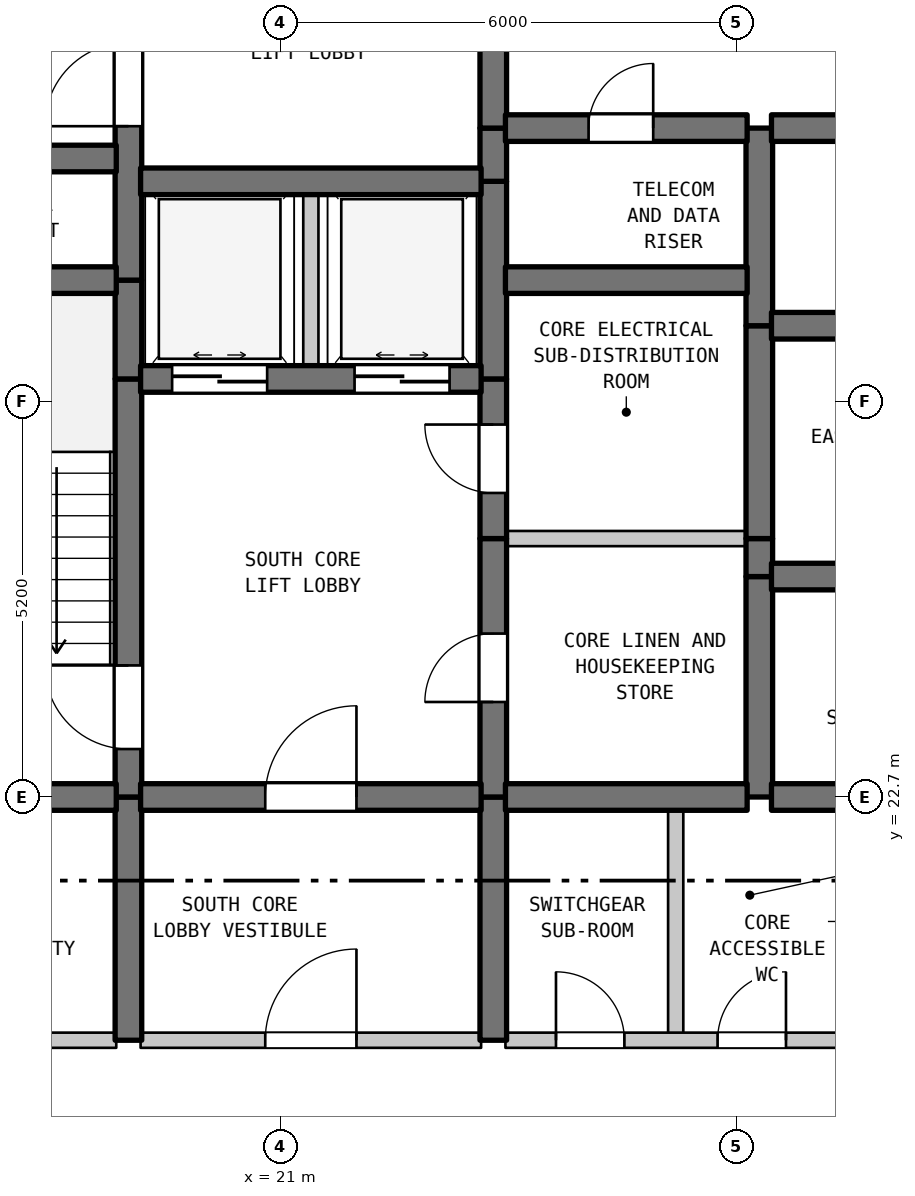
"""IFC4 building model, lengths in metres.
Left out: names, types, materials, properties, quantities, classifications, styles, units other than length and angle.
Written with IfcOpenShell. Run it as: python <this file> out.ifc"""

import sys

from ifc_helpers import new_model, si_unit, direction, frame, frame_2d, origin, place, context, subcontext, project, spatial, rectangle, extrude, element, fill, save


model = new_model("IFC4")
c1 = context("Model", 3, precision=1e-05, world=origin(), true_north=direction((0.0, 1.0)))
c2 = subcontext(c1, "Body", "Model", "MODEL_VIEW")
j1 = project(units=[si_unit("LENGTHUNIT", "METRE"), si_unit("PLANEANGLEUNIT", "RADIAN")], contexts=[c1])
p1 = place(None, origin())
s1 = spatial("IfcSite", under=j1, at=p1, CompositionType="ELEMENT")
p2 = place(p1, origin())
s2 = spatial("IfcBuilding", under=s1, at=p2, CompositionType="ELEMENT")
p3 = place(p2, frame((0.0, 0.0, 295.4)))
s3 = spatial("IfcBuildingStorey", under=s2, at=p3, CompositionType="ELEMENT", Elevation=295.4)
p4 = place(p3, frame((19.0, 19.5, 0.0), z_axis=(0.0, 0.0, 1.0), x_axis=(0.0, 1.0, 0.0)))
e1 = element("IfcWall", 1, at=p4, inside=s3, PredefinedType="SHEAR", context=c2, shape_type="SweptSolid", body=[
    extrude(rectangle(XDim=3.2, YDim=0.35, at=frame_2d((1.6, 0.0))), origin(), (0.0, 0.0, 1.0), 3.38),
])
p5 = place(p3, frame((19.0, 22.7, 0.0), z_axis=(0.0, 0.0, 1.0), x_axis=(0.0, 1.0, 0.0)))
e2 = element("IfcWall", 2, at=p5, inside=s3, PredefinedType="SHEAR", context=c2, shape_type="SweptSolid", body=[
    extrude(rectangle(XDim=5.5, YDim=0.35, at=frame_2d((2.75, 0.0))), origin(), (0.0, 0.0, 1.0), 3.38),
])
p6 = place(p5, frame((0.631, 0.0, 0.0)))
e3 = element("IfcOpeningElement", 3, at=p6, cuts=e2, PredefinedType="OPENING", context=c2, shape_type="SweptSolid", body=[
    extrude(rectangle(XDim=1.1, YDim=2.15, at=frame_2d((0.55, 1.075))), frame((0.0, 0.185, 0.0), z_axis=(0.0, -1.0, 0.0), x_axis=(1.0, 0.0, 0.0)), (0.0, 0.0, 1.0), 0.37),
])
p7 = place(p3, frame((19.0, 28.2, 0.0), z_axis=(0.0, 0.0, 1.0), x_axis=(0.0, 1.0, 0.0)))
e4 = element("IfcWall", 4, at=p7, inside=s3, PredefinedType="SHEAR", context=c2, shape_type="SweptSolid", body=[
    extrude(rectangle(XDim=1.3, YDim=0.35, at=frame_2d((0.65, 0.0))), origin(), (0.0, 0.0, 1.0), 3.38),
])
p8 = place(p3, frame((19.0, 29.5, 0.0), z_axis=(0.0, 0.0, 1.0), x_axis=(0.0, 1.0, 0.0)))
e5 = element("IfcWall", 5, at=p8, inside=s3, PredefinedType="SHEAR", context=c2, shape_type="SweptSolid", body=[
    extrude(rectangle(XDim=5.5, YDim=0.35, at=frame_2d((2.75, 0.0))), origin(), (0.0, 0.0, 1.0), 3.38),
])
p9 = place(p8, frame((2.025, 0.0, 0.0)))
e6 = element("IfcOpeningElement", 6, at=p9, cuts=e5, PredefinedType="OPENING", context=c2, shape_type="SweptSolid", body=[
    extrude(rectangle(XDim=1.1, YDim=2.15, at=frame_2d((0.55, 1.075))), frame((0.0, 0.185, 0.0), z_axis=(0.0, -1.0, 0.0), x_axis=(1.0, 0.0, 0.0)), (0.0, 0.0, 1.0), 0.37),
])
p10 = place(p3, frame((21.4, 28.2, 0.0), z_axis=(0.0, 0.0, 1.0), x_axis=(0.0, 1.0, 0.0)))
e7 = element("IfcWall", 7, at=p10, inside=s3, PredefinedType="STANDARD", context=c2, shape_type="SweptSolid", body=[
    extrude(rectangle(XDim=2.6, YDim=0.2, at=frame_2d((1.3, 0.0))), origin(), (0.0, 0.0, 1.0), 3.38),
])
p11 = place(p3, frame((23.8, 19.5, 0.0), z_axis=(0.0, 0.0, 1.0), x_axis=(0.0, 1.0, 0.0)))
e8 = element("IfcWall", 8, at=p11, inside=s3, PredefinedType="SHEAR", context=c2, shape_type="SweptSolid", body=[
    extrude(rectangle(XDim=3.2, YDim=0.35, at=frame_2d((1.6, 0.0))), origin(), (0.0, 0.0, 1.0), 3.38),
])
p12 = place(p3, frame((23.8, 22.7, 0.0), z_axis=(0.0, 0.0, 1.0), x_axis=(0.0, 1.0, 0.0)))
e9 = element("IfcWall", 9, at=p12, inside=s3, PredefinedType="SHEAR", context=c2, shape_type="SweptSolid", body=[
    extrude(rectangle(XDim=3.4, YDim=0.35, at=frame_2d((1.7, 0.0))), origin(), (0.0, 0.0, 1.0), 3.38),
])
p13 = place(p12, frame((1.25, 0.0, 0.0)))
e10 = element("IfcOpeningElement", 10, at=p13, cuts=e9, PredefinedType="OPENING", context=c2, shape_type="SweptSolid", body=[
    extrude(rectangle(XDim=0.9, YDim=2.15, at=frame_2d((0.45, 1.075))), frame((0.0, 0.185, 0.0), z_axis=(0.0, -1.0, 0.0), x_axis=(1.0, 0.0, 0.0)), (0.0, 0.0, 1.0), 0.37),
])
p14 = place(p3, frame((23.8, 26.1, 0.0), z_axis=(0.0, 0.0, 1.0), x_axis=(0.0, 1.0, 0.0)))
e11 = element("IfcWall", 11, at=p14, inside=s3, PredefinedType="SHEAR", context=c2, shape_type="SweptSolid", body=[
    extrude(rectangle(XDim=2.1, YDim=0.35, at=frame_2d((1.05, 0.0))), origin(), (0.0, 0.0, 1.0), 3.38),
])
p15 = place(p14, frame((0.6, 0.0, 0.0)))
e12 = element("IfcOpeningElement", 12, at=p15, cuts=e11, PredefinedType="OPENING", context=c2, shape_type="SweptSolid", body=[
    extrude(rectangle(XDim=0.9, YDim=2.15, at=frame_2d((0.45, 1.075))), frame((0.0, 0.185, 0.0), z_axis=(0.0, -1.0, 0.0), x_axis=(1.0, 0.0, 0.0)), (0.0, 0.0, 1.0), 0.37),
])
p16 = place(p3, frame((23.8, 28.2, 0.0), z_axis=(0.0, 0.0, 1.0), x_axis=(0.0, 1.0, 0.0)))
e13 = element("IfcWall", 13, at=p16, inside=s3, PredefinedType="SHEAR", context=c2, shape_type="SweptSolid", body=[
    extrude(rectangle(XDim=2.6, YDim=0.35, at=frame_2d((1.3, 0.0))), origin(), (0.0, 0.0, 1.0), 3.38),
])
p17 = place(p3, frame((23.8, 30.8, 0.0), z_axis=(0.0, 0.0, 1.0), x_axis=(0.0, 1.0, 0.0)))
e14 = element("IfcWall", 14, at=p17, inside=s3, PredefinedType="SHEAR", context=c2, shape_type="SweptSolid", body=[
    extrude(rectangle(XDim=0.7, YDim=0.35, at=frame_2d((0.35, 0.0))), origin(), (0.0, 0.0, 1.0), 3.38),
])
p18 = place(p3, frame((23.8, 31.5, 0.0), z_axis=(0.0, 0.0, 1.0), x_axis=(0.0, 1.0, 0.0)))
e15 = element("IfcWall", 15, at=p18, inside=s3, PredefinedType="SHEAR", context=c2, shape_type="SweptSolid", body=[
    extrude(rectangle(XDim=3.5, YDim=0.35, at=frame_2d((1.75, 0.0))), origin(), (0.0, 0.0, 1.0), 3.38),
])
p19 = place(p18, frame((1.127, 0.0, 0.0)))
e16 = element("IfcOpeningElement", 16, at=p19, cuts=e15, PredefinedType="OPENING", context=c2, shape_type="SweptSolid", body=[
    extrude(rectangle(XDim=1.1, YDim=2.15, at=frame_2d((0.55, 1.075))), frame((0.0, 0.185, 0.0), z_axis=(0.0, -1.0, 0.0), x_axis=(1.0, 0.0, 0.0)), (0.0, 0.0, 1.0), 0.37),
])
p20 = place(p3, frame((26.2, 19.5, 0.0), z_axis=(0.0, 0.0, 1.0), x_axis=(0.0, 1.0, 0.0)))
e17 = element("IfcWall", 17, at=p20, inside=s3, PredefinedType="STANDARD", context=c2, shape_type="SweptSolid", body=[
    extrude(rectangle(XDim=3.2, YDim=0.2, at=frame_2d((1.6, 0.0))), origin(), (0.0, 0.0, 1.0), 3.38),
])
p21 = place(p3, frame((27.3, 22.7, 0.0), z_axis=(0.0, 0.0, 1.0), x_axis=(0.0, 1.0, 0.0)))
e18 = element("IfcWall", 18, at=p21, inside=s3, PredefinedType="SHEAR", context=c2, shape_type="SweptSolid", body=[
    extrude(rectangle(XDim=2.9, YDim=0.35, at=frame_2d((1.45, 0.0))), origin(), (0.0, 0.0, 1.0), 3.38),
])
p22 = place(p3, frame((27.3, 25.6, 0.0), z_axis=(0.0, 0.0, 1.0), x_axis=(0.0, 1.0, 0.0)))
e19 = element("IfcWall", 19, at=p22, inside=s3, PredefinedType="SHEAR", context=c2, shape_type="SweptSolid", body=[
    extrude(rectangle(XDim=0.5, YDim=0.35, at=frame_2d((0.25, 0.0))), origin(), (0.0, 0.0, 1.0), 3.38),
])
p23 = place(p3, frame((27.3, 26.1, 0.0), z_axis=(0.0, 0.0, 1.0), x_axis=(0.0, 1.0, 0.0)))
e20 = element("IfcWall", 20, at=p23, inside=s3, PredefinedType="SHEAR", context=c2, shape_type="SweptSolid", body=[
    extrude(rectangle(XDim=2.8, YDim=0.35, at=frame_2d((1.4, 0.0))), origin(), (0.0, 0.0, 1.0), 3.38),
])
p24 = place(p3, frame((27.3, 28.9, 0.0), z_axis=(0.0, 0.0, 1.0), x_axis=(0.0, 1.0, 0.0)))
e21 = element("IfcWall", 21, at=p24, inside=s3, PredefinedType="SHEAR", context=c2, shape_type="SweptSolid", body=[
    extrude(rectangle(XDim=2.6, YDim=0.35, at=frame_2d((1.3, 0.0))), origin(), (0.0, 0.0, 1.0), 3.38),
])
p25 = place(p3, frame((15.16, 19.5, 0.0), z_axis=(0.0, 0.0, 1.0), x_axis=(1.0, 0.0, 0.0)))
e22 = element("IfcWall", 22, at=p25, inside=s3, PredefinedType="STANDARD", context=c2, shape_type="SweptSolid", body=[
    extrude(rectangle(XDim=3.68, YDim=0.2, at=frame_2d((1.84, 0.0))), origin(), (0.0, 0.0, 1.0), 3.38),
])
p26 = place(p25, frame((1.39, 0.0, 0.0)))
e23 = element("IfcOpeningElement", 23, at=p26, cuts=e22, PredefinedType="OPENING", context=c2, shape_type="SweptSolid", body=[
    extrude(rectangle(XDim=0.9, YDim=2.15, at=frame_2d((0.45, 1.075))), frame((0.0, 0.11, 0.0), z_axis=(0.0, -1.0, 0.0), x_axis=(1.0, 0.0, 0.0)), (0.0, 0.0, 1.0), 0.22),
])
p27 = place(p3, frame((19.16, 19.5, 0.0), z_axis=(0.0, 0.0, 1.0), x_axis=(1.0, 0.0, 0.0)))
e24 = element("IfcWall", 24, at=p27, inside=s3, PredefinedType="STANDARD", context=c2, shape_type="SweptSolid", body=[
    extrude(rectangle(XDim=4.48, YDim=0.2, at=frame_2d((2.24, 0.0))), origin(), (0.0, 0.0, 1.0), 3.38),
])
p28 = place(p27, frame((1.64, 0.0, 0.0)))
e25 = element("IfcOpeningElement", 25, at=p28, cuts=e24, PredefinedType="OPENING", context=c2, shape_type="SweptSolid", body=[
    extrude(rectangle(XDim=1.2, YDim=2.2, at=frame_2d((0.6, 1.1))), frame((0.0, 0.11, 0.0), z_axis=(0.0, -1.0, 0.0), x_axis=(1.0, 0.0, 0.0)), (0.0, 0.0, 1.0), 0.22),
])
p29 = place(p3, frame((23.96, 19.5, 0.0), z_axis=(0.0, 0.0, 1.0), x_axis=(1.0, 0.0, 0.0)))
e26 = element("IfcWall", 26, at=p29, inside=s3, PredefinedType="STANDARD", context=c2, shape_type="SweptSolid", body=[
    extrude(rectangle(XDim=4.455, YDim=0.2, at=frame_2d((2.228, 0.0))), origin(), (0.0, 0.0, 1.0), 3.38),
])
p30 = place(p29, frame((0.665, 0.0, 0.0)))
e27 = element("IfcOpeningElement", 27, at=p30, cuts=e26, PredefinedType="OPENING", context=c2, shape_type="SweptSolid", body=[
    extrude(rectangle(XDim=0.9, YDim=2.15, at=frame_2d((0.45, 1.075))), frame((0.0, 0.11, 0.0), z_axis=(0.0, -1.0, 0.0), x_axis=(1.0, 0.0, 0.0)), (0.0, 0.0, 1.0), 0.22),
])
p31 = place(p29, frame((2.791, 0.0, 0.0)))
e28 = element("IfcOpeningElement", 28, at=p31, cuts=e26, PredefinedType="OPENING", context=c2, shape_type="SweptSolid", body=[
    extrude(rectangle(XDim=0.9, YDim=2.15, at=frame_2d((0.45, 1.075))), frame((0.0, 0.11, 0.0), z_axis=(0.0, -1.0, 0.0), x_axis=(1.0, 0.0, 0.0)), (0.0, 0.0, 1.0), 0.22),
])
p32 = place(p3, frame((15.16, 22.7, 0.0), z_axis=(0.0, 0.0, 1.0), x_axis=(1.0, 0.0, 0.0)))
e29 = element("IfcWall", 29, at=p32, inside=s3, PredefinedType="SHEAR", context=c2, shape_type="SweptSolid", body=[
    extrude(rectangle(XDim=3.68, YDim=0.35, at=frame_2d((1.84, 0.0))), origin(), (0.0, 0.0, 1.0), 3.38),
])
p33 = place(p3, frame((19.16, 22.7, 0.0), z_axis=(0.0, 0.0, 1.0), x_axis=(1.0, 0.0, 0.0)))
e30 = element("IfcWall", 30, at=p33, inside=s3, PredefinedType="SHEAR", context=c2, shape_type="SweptSolid", body=[
    extrude(rectangle(XDim=4.48, YDim=0.35, at=frame_2d((2.24, 0.0))), origin(), (0.0, 0.0, 1.0), 3.38),
])
p34 = place(p33, frame((1.64, 0.0, 0.0)))
e31 = element("IfcOpeningElement", 31, at=p34, cuts=e30, PredefinedType="OPENING", context=c2, shape_type="SweptSolid", body=[
    extrude(rectangle(XDim=1.2, YDim=2.2, at=frame_2d((0.6, 1.1))), frame((0.0, 0.185, 0.0), z_axis=(0.0, -1.0, 0.0), x_axis=(1.0, 0.0, 0.0)), (0.0, 0.0, 1.0), 0.37),
])
p35 = place(p3, frame((23.96, 22.7, 0.0), z_axis=(0.0, 0.0, 1.0), x_axis=(1.0, 0.0, 0.0)))
e32 = element("IfcWall", 32, at=p35, inside=s3, PredefinedType="SHEAR", context=c2, shape_type="SweptSolid", body=[
    extrude(rectangle(XDim=3.18, YDim=0.35, at=frame_2d((1.59, 0.0))), origin(), (0.0, 0.0, 1.0), 3.38),
])
p36 = place(p3, frame((27.46, 22.7, 0.0), z_axis=(0.0, 0.0, 1.0), x_axis=(1.0, 0.0, 0.0)))
e33 = element("IfcWall", 33, at=p36, inside=s3, PredefinedType="SHEAR", context=c2, shape_type="SweptSolid", body=[
    extrude(rectangle(XDim=0.955, YDim=0.35, at=frame_2d((0.478, 0.0))), origin(), (0.0, 0.0, 1.0), 3.38),
])
p37 = place(p3, frame((27.46, 25.6, 0.0), z_axis=(0.0, 0.0, 1.0), x_axis=(1.0, 0.0, 0.0)))
e34 = element("IfcWall", 34, at=p37, inside=s3, PredefinedType="SHEAR", context=c2, shape_type="SweptSolid", body=[
    extrude(rectangle(XDim=3.18, YDim=0.35, at=frame_2d((1.59, 0.0))), origin(), (0.0, 0.0, 1.0), 3.38),
])
p38 = place(p37, frame((1.115, 0.0, 0.0)))
e35 = element("IfcOpeningElement", 35, at=p38, cuts=e34, PredefinedType="OPENING", context=c2, shape_type="SweptSolid", body=[
    extrude(rectangle(XDim=0.95, YDim=2.15, at=frame_2d((0.475, 1.075))), frame((0.0, 0.185, 0.0), z_axis=(0.0, -1.0, 0.0), x_axis=(1.0, 0.0, 0.0)), (0.0, 0.0, 1.0), 0.37),
])
p39 = place(p3, frame((23.96, 26.1, 0.0), z_axis=(0.0, 0.0, 1.0), x_axis=(1.0, 0.0, 0.0)))
e36 = element("IfcWall", 36, at=p39, inside=s3, PredefinedType="STANDARD", context=c2, shape_type="SweptSolid", body=[
    extrude(rectangle(XDim=3.18, YDim=0.2, at=frame_2d((1.59, 0.0))), origin(), (0.0, 0.0, 1.0), 3.38),
])
p40 = place(p3, frame((19.16, 28.2, 0.0), z_axis=(0.0, 0.0, 1.0), x_axis=(1.0, 0.0, 0.0)))
e37 = element("IfcWall", 37, at=p40, inside=s3, PredefinedType="SHEAR", context=c2, shape_type="SweptSolid", body=[
    extrude(rectangle(XDim=4.48, YDim=0.35, at=frame_2d((2.24, 0.0))), origin(), (0.0, 0.0, 1.0), 3.38),
])
p41 = place(p40, frame((0.415, 0.0, 0.0)))
e38 = element("IfcOpeningElement", 38, at=p41, cuts=e37, PredefinedType="OPENING", context=c2, shape_type="SweptSolid", body=[
    extrude(rectangle(XDim=1.25, YDim=2.2, at=frame_2d((0.625, 1.1))), frame((0.0, 0.185, 0.0), z_axis=(0.0, -1.0, 0.0), x_axis=(1.0, 0.0, 0.0)), (0.0, 0.0, 1.0), 0.37),
])
p42 = place(p40, frame((2.815, 0.0, 0.0)))
e39 = element("IfcOpeningElement", 39, at=p42, cuts=e37, PredefinedType="OPENING", context=c2, shape_type="SweptSolid", body=[
    extrude(rectangle(XDim=1.25, YDim=2.2, at=frame_2d((0.625, 1.1))), frame((0.0, 0.185, 0.0), z_axis=(0.0, -1.0, 0.0), x_axis=(1.0, 0.0, 0.0)), (0.0, 0.0, 1.0), 0.37),
])
p43 = place(p3, frame((27.46, 28.9, 0.0), z_axis=(0.0, 0.0, 1.0), x_axis=(1.0, 0.0, 0.0)))
e40 = element("IfcWall", 40, at=p43, inside=s3, PredefinedType="SHEAR", context=c2, shape_type="SweptSolid", body=[
    extrude(rectangle(XDim=3.18, YDim=0.35, at=frame_2d((1.59, 0.0))), origin(), (0.0, 0.0, 1.0), 3.38),
])
p44 = place(p43, frame((1.115, 0.0, 0.0)))
e41 = element("IfcOpeningElement", 41, at=p44, cuts=e40, PredefinedType="OPENING", context=c2, shape_type="SweptSolid", body=[
    extrude(rectangle(XDim=0.95, YDim=2.15, at=frame_2d((0.475, 1.075))), frame((0.0, 0.185, 0.0), z_axis=(0.0, -1.0, 0.0), x_axis=(1.0, 0.0, 0.0)), (0.0, 0.0, 1.0), 0.37),
])
p45 = place(p3, frame((15.16, 29.5, 0.0), z_axis=(0.0, 0.0, 1.0), x_axis=(1.0, 0.0, 0.0)))
e42 = element("IfcWall", 42, at=p45, inside=s3, PredefinedType="SHEAR", context=c2, shape_type="SweptSolid", body=[
    extrude(rectangle(XDim=3.68, YDim=0.35, at=frame_2d((1.84, 0.0))), origin(), (0.0, 0.0, 1.0), 3.38),
])
p46 = place(p3, frame((23.96, 29.5, 0.0), z_axis=(0.0, 0.0, 1.0), x_axis=(1.0, 0.0, 0.0)))
e43 = element("IfcWall", 43, at=p46, inside=s3, PredefinedType="SHEAR", context=c2, shape_type="SweptSolid", body=[
    extrude(rectangle(XDim=3.18, YDim=0.35, at=frame_2d((1.59, 0.0))), origin(), (0.0, 0.0, 1.0), 3.38),
])
p47 = place(p3, frame((19.16, 30.8, 0.0), z_axis=(0.0, 0.0, 1.0), x_axis=(1.0, 0.0, 0.0)))
e44 = element("IfcWall", 44, at=p47, inside=s3, PredefinedType="SHEAR", context=c2, shape_type="SweptSolid", body=[
    extrude(rectangle(XDim=4.48, YDim=0.35, at=frame_2d((2.24, 0.0))), origin(), (0.0, 0.0, 1.0), 3.38),
])
p48 = place(p3, frame((15.16, 31.1, 0.0), z_axis=(0.0, 0.0, 1.0), x_axis=(1.0, 0.0, 0.0)))
e45 = element("IfcWall", 45, at=p48, inside=s3, PredefinedType="SHEAR", context=c2, shape_type="SweptSolid", body=[
    extrude(rectangle(XDim=3.68, YDim=0.35, at=frame_2d((1.84, 0.0))), origin(), (0.0, 0.0, 1.0), 3.38),
])
p49 = place(p3, frame((23.96, 31.5, 0.0), z_axis=(0.0, 0.0, 1.0), x_axis=(1.0, 0.0, 0.0)))
e46 = element("IfcWall", 46, at=p49, inside=s3, PredefinedType="SHEAR", context=c2, shape_type="SweptSolid", body=[
    extrude(rectangle(XDim=3.18, YDim=0.35, at=frame_2d((1.59, 0.0))), origin(), (0.0, 0.0, 1.0), 3.38),
])
p50 = place(p49, frame((1.094, 0.0, 0.0)))
e47 = element("IfcOpeningElement", 47, at=p50, cuts=e46, PredefinedType="OPENING", context=c2, shape_type="SweptSolid", body=[
    extrude(rectangle(XDim=0.85, YDim=2.1, at=frame_2d((0.425, 1.05))), frame((0.0, 0.185, 0.0), z_axis=(0.0, -1.0, 0.0), x_axis=(1.0, 0.0, 0.0)), (0.0, 0.0, 1.0), 0.37),
])
p51 = place(p3, frame((27.46, 31.5, 0.0), z_axis=(0.0, 0.0, 1.0), x_axis=(1.0, 0.0, 0.0)))
e48 = element("IfcWall", 48, at=p51, inside=s3, PredefinedType="SHEAR", context=c2, shape_type="SweptSolid", body=[
    extrude(rectangle(XDim=3.18, YDim=0.35, at=frame_2d((1.59, 0.0))), origin(), (0.0, 0.0, 1.0), 3.38),
])
p52 = place(p6, origin())
e49 = element("IfcDoor", 49, at=p52, inside=s3, OperationType="SINGLE_SWING_RIGHT", PredefinedType="DOOR", context=c2, shape_type="SweptSolid", body=[
    extrude(rectangle(XDim=1.1, YDim=2.15, at=frame_2d((0.55, 1.075))), frame((0.0, 0.025, 0.0), z_axis=(0.0, -1.0, 0.0), x_axis=(1.0, 0.0, 0.0)), (0.0, 0.0, 1.0), 0.05),
])
fill(e3, e49)
p53 = place(p9, origin())
e50 = element("IfcDoor", 50, at=p53, inside=s3, OperationType="SINGLE_SWING_LEFT", PredefinedType="DOOR", context=c2, shape_type="SweptSolid", body=[
    extrude(rectangle(XDim=1.1, YDim=2.15, at=frame_2d((0.55, 1.075))), frame((0.0, 0.025, 0.0), z_axis=(0.0, -1.0, 0.0), x_axis=(1.0, 0.0, 0.0)), (0.0, 0.0, 1.0), 0.05),
])
fill(e6, e50)
p54 = place(p13, origin())
e51 = element("IfcDoor", 51, at=p54, inside=s3, OperationType="SINGLE_SWING_LEFT", PredefinedType="DOOR", context=c2, shape_type="SweptSolid", body=[
    extrude(rectangle(XDim=0.9, YDim=2.15, at=frame_2d((0.45, 1.075))), frame((0.0, 0.025, 0.0), z_axis=(0.0, -1.0, 0.0), x_axis=(1.0, 0.0, 0.0)), (0.0, 0.0, 1.0), 0.05),
])
fill(e10, e51)
p55 = place(p15, origin())
e52 = element("IfcDoor", 52, at=p55, inside=s3, OperationType="SINGLE_SWING_RIGHT", PredefinedType="DOOR", context=c2, shape_type="SweptSolid", body=[
    extrude(rectangle(XDim=0.9, YDim=2.15, at=frame_2d((0.45, 1.075))), frame((0.0, 0.025, 0.0), z_axis=(0.0, -1.0, 0.0), x_axis=(1.0, 0.0, 0.0)), (0.0, 0.0, 1.0), 0.05),
])
fill(e12, e52)
p56 = place(p28, origin())
e53 = element("IfcDoor", 53, at=p56, inside=s3, OperationType="SINGLE_SWING_RIGHT", PredefinedType="DOOR", context=c2, shape_type="SweptSolid", body=[
    extrude(rectangle(XDim=1.2, YDim=2.2, at=frame_2d((0.6, 1.1))), frame((0.0, 0.025, 0.0), z_axis=(0.0, -1.0, 0.0), x_axis=(1.0, 0.0, 0.0)), (0.0, 0.0, 1.0), 0.05),
])
fill(e25, e53)
p57 = place(p30, origin())
e54 = element("IfcDoor", 54, at=p57, inside=s3, OperationType="SINGLE_SWING_LEFT", PredefinedType="DOOR", context=c2, shape_type="SweptSolid", body=[
    extrude(rectangle(XDim=0.9, YDim=2.15, at=frame_2d((0.45, 1.075))), frame((0.0, 0.025, 0.0), z_axis=(0.0, -1.0, 0.0), x_axis=(1.0, 0.0, 0.0)), (0.0, 0.0, 1.0), 0.05),
])
fill(e27, e54)
p58 = place(p31, origin())
e55 = element("IfcDoor", 55, at=p58, inside=s3, OperationType="SINGLE_SWING_RIGHT", PredefinedType="DOOR", context=c2, shape_type="SweptSolid", body=[
    extrude(rectangle(XDim=0.9, YDim=2.15, at=frame_2d((0.45, 1.075))), frame((0.0, 0.025, 0.0), z_axis=(0.0, -1.0, 0.0), x_axis=(1.0, 0.0, 0.0)), (0.0, 0.0, 1.0), 0.05),
])
fill(e28, e55)
p59 = place(p34, origin())
e56 = element("IfcDoor", 56, at=p59, inside=s3, OperationType="SINGLE_SWING_RIGHT", PredefinedType="DOOR", context=c2, shape_type="SweptSolid", body=[
    extrude(rectangle(XDim=1.2, YDim=2.2, at=frame_2d((0.6, 1.1))), frame((0.0, 0.025, 0.0), z_axis=(0.0, -1.0, 0.0), x_axis=(1.0, 0.0, 0.0)), (0.0, 0.0, 1.0), 0.05),
])
fill(e31, e56)
p60 = place(p41, origin())
e57 = element("IfcDoor", 57, at=p60, inside=s3, OperationType="DOUBLE_DOOR_SLIDING", PredefinedType="DOOR", context=c2, shape_type="SweptSolid", body=[
    extrude(rectangle(XDim=1.25, YDim=2.2, at=frame_2d((0.625, 1.1))), frame((0.0, 0.025, 0.0), z_axis=(0.0, -1.0, 0.0), x_axis=(1.0, 0.0, 0.0)), (0.0, 0.0, 1.0), 0.05),
])
fill(e38, e57)
p61 = place(p42, origin())
e58 = element("IfcDoor", 58, at=p61, inside=s3, OperationType="DOUBLE_DOOR_SLIDING", PredefinedType="DOOR", context=c2, shape_type="SweptSolid", body=[
    extrude(rectangle(XDim=1.25, YDim=2.2, at=frame_2d((0.625, 1.1))), frame((0.0, 0.025, 0.0), z_axis=(0.0, -1.0, 0.0), x_axis=(1.0, 0.0, 0.0)), (0.0, 0.0, 1.0), 0.05),
])
fill(e39, e58)
p62 = place(p50, origin())
e59 = element("IfcDoor", 59, at=p62, inside=s3, OperationType="SINGLE_SWING_RIGHT", PredefinedType="DOOR", context=c2, shape_type="SweptSolid", body=[
    extrude(rectangle(XDim=0.85, YDim=2.1, at=frame_2d((0.425, 1.05))), frame((0.0, 0.025, 0.0), z_axis=(0.0, -1.0, 0.0), x_axis=(1.0, 0.0, 0.0)), (0.0, 0.0, 1.0), 0.05),
])
fill(e47, e59)
save(model, sys.argv[1])
